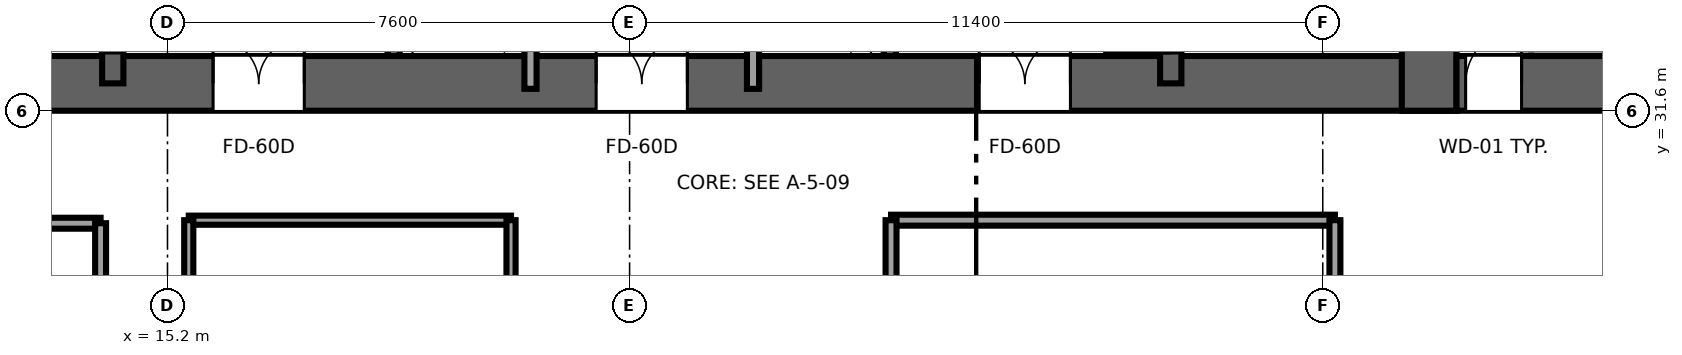
"""IFC4 building model, lengths in metres.
Left out: names, types, materials, properties, quantities, classifications, styles, units other than length and angle.
Written with IfcOpenShell. Run it as: python <this file> out.ifc"""

import sys

from ifc_helpers import new_model, si_unit, direction, frame, frame_2d, origin, place, context, subcontext, project, spatial, rectangle, extrude, source, transform, mapped, element, fill, save


model = new_model("IFC4")
c1 = context("Model", 3, precision=1e-05, world=origin(), true_north=direction((0.0, 1.0)))
c2 = subcontext(c1, "Body", "Model", "MODEL_VIEW")
j1 = project(units=[si_unit("LENGTHUNIT", "METRE"), si_unit("PLANEANGLEUNIT", "RADIAN")], contexts=[c1])
p1 = place(None, origin())
s1 = spatial("IfcSite", under=j1, at=p1, CompositionType="ELEMENT")
p2 = place(p1, origin())
s2 = spatial("IfcBuilding", under=s1, at=p2, CompositionType="ELEMENT")
p3 = place(p2, frame((0.0, 0.0, 85.25)))
s3 = spatial("IfcBuildingStorey", under=s2, at=p3, CompositionType="ELEMENT", Elevation=85.25)
p4 = place(p3, frame((9.6, 32.05, 0.0), z_axis=(0.0, 0.0, 1.0), x_axis=(1.0, 0.0, 0.0)))
e1 = element("IfcWall", 1, at=p4, inside=s3, PredefinedType="SHEAR", context=c2, shape_type="SweptSolid", body=[
    extrude(rectangle(XDim=26.8, YDim=0.9, at=frame_2d((13.4, 0.0))), origin(), (0.0, 0.0, 1.0), 3.55),
])
p5 = place(p4, frame((7.85, 0.0, 0.0), z_axis=(0.0, 0.0, 1.0), x_axis=(-1.0, 0.0, 0.0)))
e2 = element("IfcOpeningElement", 2, at=p5, cuts=e1, PredefinedType="OPENING", context=c2, shape_type="SweptSolid", body=[
    extrude(rectangle(XDim=1.5, YDim=2.04, at=frame_2d((0.75, 1.02))), frame((0.0, 0.46, 0.0), z_axis=(0.0, -1.0, 0.0), x_axis=(1.0, 0.0, 0.0)), (0.0, 0.0, 1.0), 0.92),
])
p6 = place(p4, frame((14.15, 0.0, 0.0), z_axis=(0.0, 0.0, 1.0), x_axis=(-1.0, 0.0, 0.0)))
e3 = element("IfcOpeningElement", 3, at=p6, cuts=e1, PredefinedType="OPENING", context=c2, shape_type="SweptSolid", body=[
    extrude(rectangle(XDim=1.5, YDim=2.04, at=frame_2d((0.75, 1.02))), frame((0.0, 0.46, 0.0), z_axis=(0.0, -1.0, 0.0), x_axis=(1.0, 0.0, 0.0)), (0.0, 0.0, 1.0), 0.92),
])
p7 = place(p4, frame((20.45, 0.0, 0.0), z_axis=(0.0, 0.0, 1.0), x_axis=(-1.0, 0.0, 0.0)))
e4 = element("IfcOpeningElement", 4, at=p7, cuts=e1, PredefinedType="OPENING", context=c2, shape_type="SweptSolid", body=[
    extrude(rectangle(XDim=1.5, YDim=2.04, at=frame_2d((0.75, 1.02))), frame((0.0, 0.46, 0.0), z_axis=(0.0, -1.0, 0.0), x_axis=(1.0, 0.0, 0.0)), (0.0, 0.0, 1.0), 0.92),
])
p8 = place(p3, frame((35.95, 31.6, 0.0), z_axis=(0.0, 0.0, 1.0), x_axis=(0.0, 1.0, 0.0)))
e5 = element("IfcWall", 5, at=p8, inside=s3, PredefinedType="SHEAR", context=c2, shape_type="SweptSolid", body=[
    extrude(rectangle(XDim=13.6, YDim=0.9, at=frame_2d((6.8, 0.0))), origin(), (0.0, 0.0, 1.0), 3.55),
])
p9 = place(p3, frame((14.3, 32.05, 0.0), z_axis=(0.0, 0.0, 1.0), x_axis=(0.0, 1.0, 0.0)))
e6 = element("IfcWall", 6, at=p9, inside=s3, PredefinedType="SHEAR", context=c2, shape_type="SweptSolid", body=[
    extrude(rectangle(XDim=12.7, YDim=0.35, at=frame_2d((6.35, 0.0))), origin(), (0.0, 0.0, 1.0), 3.55),
])
p10 = place(p9, frame((0.5, 0.0, 0.0)))
e7 = element("IfcOpeningElement", 7, at=p10, cuts=e6, PredefinedType="OPENING", context=c2, shape_type="SweptSolid", body=[
    extrude(rectangle(XDim=1.1, YDim=2.12, at=frame_2d((0.55, 1.06))), frame((0.0, 0.185, 0.0), z_axis=(0.0, -1.0, 0.0), x_axis=(1.0, 0.0, 0.0)), (0.0, 0.0, 1.0), 0.37),
])
p11 = place(p3, frame((31.7, 32.05, 0.0), z_axis=(0.0, 0.0, 1.0), x_axis=(0.0, 1.0, 0.0)))
e8 = element("IfcWall", 8, at=p11, inside=s3, PredefinedType="SHEAR", context=c2, shape_type="SweptSolid", body=[
    extrude(rectangle(XDim=12.7, YDim=0.35, at=frame_2d((6.35, 0.0))), origin(), (0.0, 0.0, 1.0), 3.55),
])
p12 = place(p11, frame((1.6, 0.0, 0.0), z_axis=(0.0, 0.0, 1.0), x_axis=(-1.0, 0.0, 0.0)))
e9 = element("IfcOpeningElement", 9, at=p12, cuts=e8, PredefinedType="OPENING", context=c2, shape_type="SweptSolid", body=[
    extrude(rectangle(XDim=1.1, YDim=2.12, at=frame_2d((0.55, 1.06))), frame((0.0, 0.185, 0.0), z_axis=(0.0, -1.0, 0.0), x_axis=(1.0, 0.0, 0.0)), (0.0, 0.0, 1.0), 0.37),
])
p13 = place(p3, frame((36.4, 32.05, 0.0), z_axis=(0.0, 0.0, 1.0), x_axis=(1.0, 0.0, 0.0)))
e10 = element("IfcWall", 10, at=p13, inside=s3, PredefinedType="SHEAR", context=c2, shape_type="SweptSolid", body=[
    extrude(rectangle(XDim=4.0, YDim=0.9, at=frame_2d((2.0, 0.0))), origin(), (0.0, 0.0, 1.0), 3.55),
])
p14 = place(p13, frame((1.07, 0.0, 0.0), z_axis=(0.0, 0.0, 1.0), x_axis=(-1.0, 0.0, 0.0)))
e11 = element("IfcOpeningElement", 11, at=p14, cuts=e10, PredefinedType="OPENING", context=c2, shape_type="SweptSolid", body=[
    extrude(rectangle(XDim=0.92, YDim=2.01, at=frame_2d((0.46, 1.005))), frame((0.0, 0.46, 0.0), z_axis=(0.0, -1.0, 0.0), x_axis=(1.0, 0.0, 0.0)), (0.0, 0.0, 1.0), 0.92),
])
for number, where, z_axis, x_axis in (
    (12, (18.92, 32.504, 0.0), (0.0, 0.0, 1.0), (0.0, 1.0, 0.0)),
    (13, (27.08, 32.504, 0.0), (0.0, 0.0, 1.0), (0.0, 1.0, 0.0)),
):
    element("IfcWall", number, at=place(p3, frame(where, z_axis=z_axis, x_axis=x_axis)), inside=s3, PredefinedType="SOLIDWALL", context=c2, shape_type="SweptSolid", body=[
        extrude(rectangle(XDim=3.646, YDim=0.2, at=frame_2d((1.823, 0.0))), origin(), (0.0, 0.0, 1.0), 3.37),
    ])
for number, where, z_axis, x_axis in (
    (14, (21.17, 31.96, 0.0), (0.0, 0.0, 1.0), (0.0, 1.0, 0.0)),
    (15, (24.83, 31.96, 0.0), (0.0, 0.0, 1.0), (0.0, 1.0, 0.0)),
):
    element("IfcWall", number, at=place(p3, frame(where, z_axis=z_axis, x_axis=x_axis)), inside=s3, PredefinedType="SOLIDWALL", context=c2, shape_type="SweptSolid", body=[
        extrude(rectangle(XDim=12.58, YDim=0.2, at=frame_2d((6.29, 0.0))), origin(), (0.0, 0.0, 1.0), 3.37),
    ])
p15 = place(p3, frame((9.88, 29.75, 0.0), z_axis=(0.0, 0.0, 1.0), x_axis=(1.0, 0.0, 0.0)))
e16 = element("IfcWall", 16, at=p15, inside=s3, PredefinedType="PARTITIONING", context=c2, shape_type="SweptSolid", body=[
    extrude(rectangle(XDim=4.22, YDim=0.18, at=frame_2d((2.11, 0.0))), origin(), (0.0, 0.0, 1.0), 3.37),
])
p16 = place(p3, frame((14.1, 22.1, 0.0), z_axis=(0.0, 0.0, 1.0), x_axis=(0.0, 1.0, 0.0)))
e17 = element("IfcWall", 17, at=p16, inside=s3, PredefinedType="PARTITIONING", context=c2, shape_type="SweptSolid", body=[
    extrude(rectangle(XDim=7.65, YDim=0.18, at=frame_2d((3.825, 0.0))), origin(), (0.0, 0.0, 1.0), 3.37),
])
p17 = place(p3, frame((27.1, 29.8, 0.0), z_axis=(0.0, 0.0, 1.0), x_axis=(1.0, 0.0, 0.0)))
e18 = element("IfcWall", 18, at=p17, inside=s3, PredefinedType="PARTITIONING", context=c2, shape_type="SweptSolid", body=[
    extrude(rectangle(XDim=7.3, YDim=0.18, at=frame_2d((3.65, 0.0))), origin(), (0.0, 0.0, 1.0), 3.37),
])
for number, where, z_axis, x_axis in (
    (19, (27.1, 22.1, 0.0), (0.0, 0.0, 1.0), (0.0, 1.0, 0.0)),
    (20, (34.4, 22.1, 0.0), (0.0, 0.0, 1.0), (0.0, 1.0, 0.0)),
):
    element("IfcWall", number, at=place(p3, frame(where, z_axis=z_axis, x_axis=x_axis)), inside=s3, PredefinedType="PARTITIONING", context=c2, shape_type="SweptSolid", body=[
        extrude(rectangle(XDim=7.7, YDim=0.18, at=frame_2d((3.85, 0.0))), origin(), (0.0, 0.0, 1.0), 3.37),
    ])
p18 = place(p3, frame((15.55, 29.8, 0.0), z_axis=(0.0, 0.0, 1.0), x_axis=(1.0, 0.0, 0.0)))
e21 = element("IfcWall", 21, at=p18, inside=s3, PredefinedType="PARTITIONING", context=c2, shape_type="SweptSolid", body=[
    extrude(rectangle(XDim=5.3, YDim=0.15, at=frame_2d((2.65, 0.0))), origin(), (0.0, 0.0, 1.0), 3.37),
])
for number, where, z_axis, x_axis in (
    (22, (15.55, 22.1, 0.0), (0.0, 0.0, 1.0), (0.0, 1.0, 0.0)),
    (23, (20.85, 22.1, 0.0), (0.0, 0.0, 1.0), (0.0, 1.0, 0.0)),
):
    element("IfcWall", number, at=place(p3, frame(where, z_axis=z_axis, x_axis=x_axis)), inside=s3, PredefinedType="PARTITIONING", context=c2, shape_type="SweptSolid", body=[
        extrude(rectangle(XDim=7.7, YDim=0.15, at=frame_2d((3.85, 0.0))), origin(), (0.0, 0.0, 1.0), 3.37),
    ])
m1 = source(origin(), c2, "Body", "SweptSolid", [
    extrude(rectangle(XDim=1.1, YDim=2.12, at=frame_2d((0.55, 1.06))), frame((0.0, 0.025, 0.0), z_axis=(0.0, -1.0, 0.0), x_axis=(1.0, 0.0, 0.0)), (0.0, 0.0, 1.0), 0.05),
])
p19 = place(p10, origin())
e24 = element("IfcDoor", 24, at=p19, inside=s3, OperationType="SINGLE_SWING_RIGHT", PredefinedType="DOOR", context=c2, shape_type="MappedRepresentation", body=[
    mapped(m1, transform((0.0, 0.0, 0.0), x_axis=(1.0, 0.0, 0.0), y_axis=(0.0, 1.0, 0.0), z_axis=(0.0, 0.0, 1.0), scale=1.0)),
])
fill(e7, e24)
p20 = place(p12, origin())
e25 = element("IfcDoor", 25, at=p20, inside=s3, OperationType="SINGLE_SWING_LEFT", PredefinedType="DOOR", context=c2, shape_type="MappedRepresentation", body=[
    mapped(m1, transform((0.0, 0.0, 0.0), x_axis=(1.0, 0.0, 0.0), y_axis=(0.0, 1.0, 0.0), z_axis=(0.0, 0.0, 1.0), scale=1.0)),
])
fill(e9, e25)
m2 = source(origin(), c2, "Body", "SweptSolid", [
    extrude(rectangle(XDim=1.5, YDim=2.04, at=frame_2d((0.75, 1.02))), frame((0.0, 0.025, 0.0), z_axis=(0.0, -1.0, 0.0), x_axis=(1.0, 0.0, 0.0)), (0.0, 0.0, 1.0), 0.05),
])
p21 = place(p5, origin())
e26 = element("IfcDoor", 26, at=p21, inside=s3, OperationType="DOUBLE_DOOR_SINGLE_SWING", PredefinedType="DOOR", context=c2, shape_type="MappedRepresentation", body=[
    mapped(m2, transform((0.0, 0.0, 0.0), x_axis=(1.0, 0.0, 0.0), y_axis=(0.0, 1.0, 0.0), z_axis=(0.0, 0.0, 1.0), scale=1.0)),
])
fill(e2, e26)
p22 = place(p6, origin())
e27 = element("IfcDoor", 27, at=p22, inside=s3, OperationType="DOUBLE_DOOR_SINGLE_SWING", PredefinedType="DOOR", context=c2, shape_type="MappedRepresentation", body=[
    mapped(m2, transform((0.0, 0.0, 0.0), x_axis=(1.0, 0.0, 0.0), y_axis=(0.0, 1.0, 0.0), z_axis=(0.0, 0.0, 1.0), scale=1.0)),
])
fill(e3, e27)
p23 = place(p7, origin())
e28 = element("IfcDoor", 28, at=p23, inside=s3, OperationType="DOUBLE_DOOR_SINGLE_SWING", PredefinedType="DOOR", context=c2, shape_type="MappedRepresentation", body=[
    mapped(m2, transform((0.0, 0.0, 0.0), x_axis=(1.0, 0.0, 0.0), y_axis=(0.0, 1.0, 0.0), z_axis=(0.0, 0.0, 1.0), scale=1.0)),
])
fill(e4, e28)
m3 = source(origin(), c2, "Body", "SweptSolid", [
    extrude(rectangle(XDim=0.92, YDim=2.01, at=frame_2d((0.46, 1.005))), frame((0.0, 0.025, 0.0), z_axis=(0.0, -1.0, 0.0), x_axis=(1.0, 0.0, 0.0)), (0.0, 0.0, 1.0), 0.05),
])
p24 = place(p14, origin())
e29 = element("IfcDoor", 29, at=p24, inside=s3, OperationType="SINGLE_SWING_RIGHT", PredefinedType="DOOR", context=c2, shape_type="MappedRepresentation", body=[
    mapped(m3, transform((0.0, 0.0, 0.0), x_axis=(1.0, 0.0, 0.0), y_axis=(0.0, 1.0, 0.0), z_axis=(0.0, 0.0, 1.0), scale=1.0)),
])
fill(e11, e29)
save(model, sys.argv[1])
